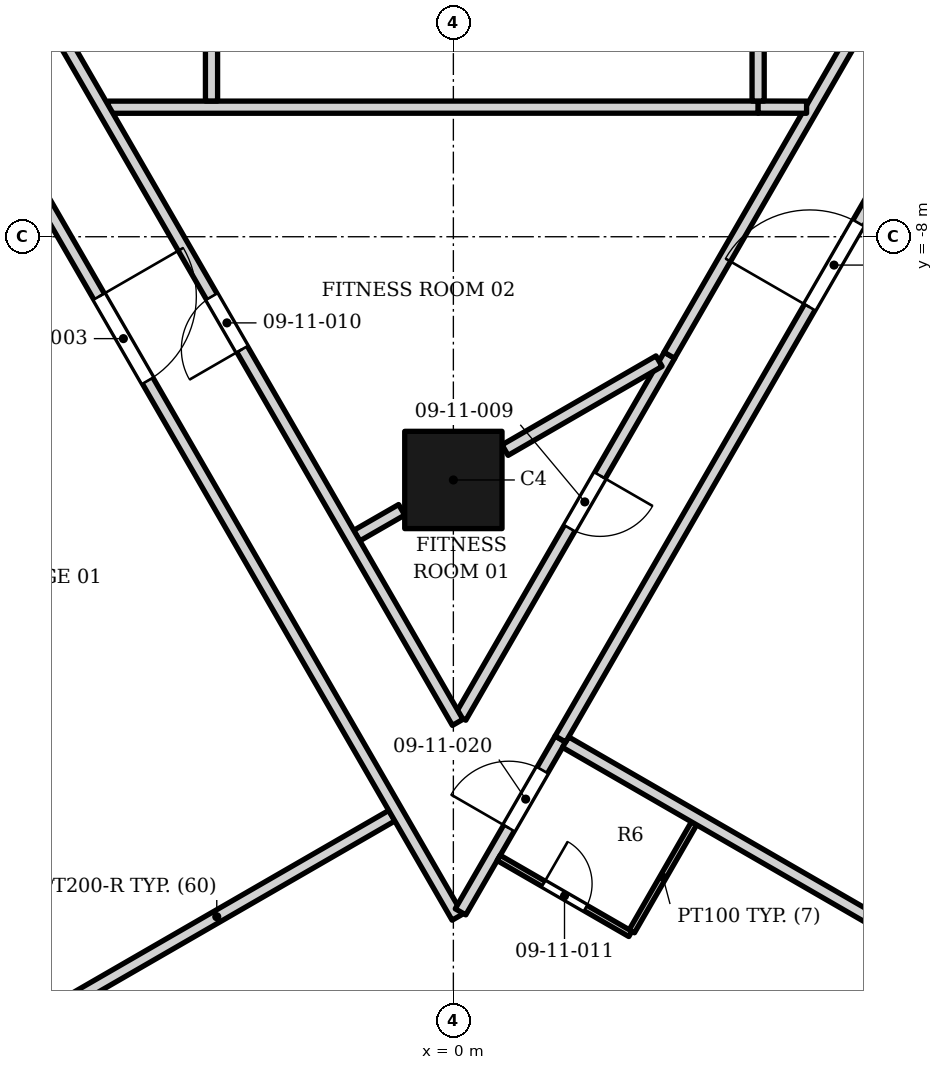
"""IFC4 building model, lengths in metres.
Left out: names, types, materials, properties, quantities, classifications, styles, units other than length and angle.
Written with IfcOpenShell. Run it as: python <this file> out.ifc"""

import sys

from ifc_helpers import new_model, si_unit, direction, frame, frame_2d, origin, origin_2d, place, context, subcontext, project, spatial, rectangle, extrude, element, fill, save


model = new_model("IFC4")
c1 = context("Model", 3, precision=1e-05, world=origin(), true_north=direction((0.0, 1.0)))
c2 = subcontext(c1, "Body", "Model", "MODEL_VIEW")
j1 = project(units=[si_unit("LENGTHUNIT", "METRE"), si_unit("PLANEANGLEUNIT", "RADIAN")], contexts=[c1])
p1 = place(None, origin())
s1 = spatial("IfcSite", under=j1, at=p1, CompositionType="ELEMENT")
p2 = place(p1, origin())
s2 = spatial("IfcBuilding", under=s1, at=p2, CompositionType="ELEMENT")
p3 = place(p2, frame((0.0, 0.0, 56.2)))
s3 = spatial("IfcBuildingStorey", under=s2, at=p3, CompositionType="ELEMENT", Elevation=56.2)
p4 = place(p3, frame((0.0, -12.0, 0.0), z_axis=(0.0, 0.0, 1.0), x_axis=(1.0, 0.0, 0.0)))
e1 = element("IfcColumn", 1, at=p4, inside=s3, PredefinedType="COLUMN", context=c2, shape_type="SweptSolid", body=[
    extrude(rectangle(XDim=1.6, YDim=1.6, at=origin_2d()), origin(), (0.0, 0.0, 1.0), 3.4),
])
p5 = place(p3, frame((6.165, -23.826, 0.0), z_axis=(0.0, 0.0, 1.0), x_axis=(0.500027713859, 0.866009402589, 0.0)))
e2 = element("IfcWall", 2, at=p5, inside=s3, PredefinedType="ELEMENTEDWALL", context=c2, shape_type="SweptSolid", body=[
    extrude(rectangle(XDim=4.2, YDim=0.2, at=frame_2d((2.1, 0.0))), origin(), (0.0, 0.0, 1.0), 2.65),
])
p6 = place(p5, frame((0.3, 0.0, 0.6)))
e3 = element("IfcOpeningElement", 3, at=p6, cuts=e2, PredefinedType="OPENING", context=c2, shape_type="SweptSolid", body=[
    extrude(rectangle(XDim=2.1, YDim=1.8, at=frame_2d((1.05, 0.9))), frame((0.0, 0.11, 0.0), z_axis=(0.0, -1.0, 0.0), x_axis=(1.0, 0.0, 0.0)), (0.0, 0.0, 1.0), 0.22),
])
p7 = place(p5, frame((2.7, 0.0, 0.0)))
e4 = element("IfcOpeningElement", 4, at=p7, cuts=e2, PredefinedType="OPENING", context=c2, shape_type="SweptSolid", body=[
    extrude(rectangle(XDim=1.2, YDim=2.4, at=frame_2d((0.6, 1.2))), frame((0.0, 0.11, 0.0), z_axis=(0.0, -1.0, 0.0), x_axis=(1.0, 0.0, 0.0)), (0.0, 0.0, 1.0), 0.22),
])
p8 = place(p3, frame((-6.771, -20.844, 0.0), z_axis=(0.0, 0.0, 1.0), x_axis=(0.866140962391, 0.499799793185, 0.0)))
e5 = element("IfcWall", 5, at=p8, inside=s3, PredefinedType="PARTITIONING", context=c2, shape_type="SweptSolid", body=[
    extrude(rectangle(XDim=6.65, YDim=0.2, at=frame_2d((3.325, 0.0))), origin(), (0.0, 0.0, 1.0), 2.552),
])
p9 = place(p3, frame((2.935, -19.422, 0.0), z_axis=(0.0, 0.0, 1.0), x_axis=(0.499354689006, 0.866397653833, 0.0)))
e6 = element("IfcWall", 6, at=p9, inside=s3, PredefinedType="PARTITIONING", context=c2, shape_type="SweptSolid", body=[
    extrude(rectangle(XDim=2.05, YDim=0.1, at=frame_2d((1.025, 0.0))), origin(), (0.0, 0.0, 1.0), 3.23),
])
p10 = place(p3, frame((-11.227, 0.37, 0.0), z_axis=(0.0, 0.0, 1.0), x_axis=(0.500006900114, -0.866021419965, 0.0)))
e7 = element("IfcWall", 7, at=p10, inside=s3, PredefinedType="PARTITIONING", context=c2, shape_type="SweptSolid", body=[
    extrude(rectangle(XDim=22.586, YDim=0.2, at=frame_2d((11.293, 0.0))), origin(), (0.0, 0.0, 1.0), 2.374),
])
p11 = place(p10, frame((10.8, 0.0, 0.0)))
e8 = element("IfcOpeningElement", 8, at=p11, cuts=e7, PredefinedType="OPENING", context=c2, shape_type="SweptSolid", body=[
    extrude(rectangle(XDim=1.6, YDim=2.1, at=frame_2d((0.8, 1.05))), frame((0.0, 0.11, 0.0), z_axis=(0.0, -1.0, 0.0), x_axis=(1.0, 0.0, 0.0)), (0.0, 0.0, 1.0), 0.22),
])
p12 = place(p3, frame((0.118, -19.102, 0.0), z_axis=(0.0, 0.0, 1.0), x_axis=(0.500402764758, 0.865792742533, 0.0)))
e9 = element("IfcWall", 9, at=p12, inside=s3, PredefinedType="PARTITIONING", context=c2, shape_type="SweptSolid", body=[
    extrude(rectangle(XDim=3.282, YDim=0.2, at=frame_2d((1.641, 0.0))), origin(), (0.0, 0.0, 1.0), 2.628),
])
p13 = place(p12, frame((1.591, 0.0, 0.0)))
e10 = element("IfcOpeningElement", 10, at=p13, cuts=e9, PredefinedType="OPENING", context=c2, shape_type="SweptSolid", body=[
    extrude(rectangle(XDim=1.1, YDim=2.1, at=frame_2d((0.55, 1.05))), frame((0.0, 0.11, 0.0), z_axis=(0.0, -1.0, 0.0), x_axis=(1.0, 0.0, 0.0)), (0.0, 0.0, 1.0), 0.22),
])
p14 = place(p3, frame((0.745, -18.215, 0.0), z_axis=(0.0, 0.0, 1.0), x_axis=(0.866022959057, -0.500004234368, 0.0)))
e11 = element("IfcWall", 11, at=p14, inside=s3, PredefinedType="PARTITIONING", context=c2, shape_type="SweptSolid", body=[
    extrude(rectangle(XDim=2.5, YDim=0.1, at=frame_2d((1.25, 0.0))), origin(), (0.0, 0.0, 1.0), 3.23),
])
p15 = place(p14, frame((0.85, 0.0, 0.0)))
e12 = element("IfcOpeningElement", 12, at=p15, cuts=e11, PredefinedType="OPENING", context=c2, shape_type="SweptSolid", body=[
    extrude(rectangle(XDim=0.8, YDim=2.1, at=frame_2d((0.4, 1.05))), frame((0.0, 0.06, 0.0), z_axis=(0.0, -1.0, 0.0), x_axis=(1.0, 0.0, 0.0)), (0.0, 0.0, 1.0), 0.12),
])
p16 = place(p3, frame((1.844, -16.311, 0.0), z_axis=(0.0, 0.0, 1.0), x_axis=(0.866037373075, -0.499979268008, 0.0)))
e13 = element("IfcWall", 13, at=p16, inside=s3, PredefinedType="PARTITIONING", context=c2, shape_type="SweptSolid", body=[
    extrude(rectangle(XDim=7.05, YDim=0.2, at=frame_2d((3.525, 0.0))), origin(), (0.0, 0.0, 1.0), 2.552),
])
p17 = place(p3, frame((0.117, -15.901, 0.0), z_axis=(0.0, 0.0, 1.0), x_axis=(0.49997760006, 0.866038336009, 0.0)))
e14 = element("IfcWall", 14, at=p17, inside=s3, PredefinedType="PARTITIONING", context=c2, shape_type="SweptSolid", body=[
    extrude(rectangle(XDim=6.875, YDim=0.2, at=frame_2d((3.438, 0.0))), origin(), (0.0, 0.0, 1.0), 2.302),
])
p18 = place(p17, frame((3.588, 0.0, 0.0)))
e15 = element("IfcOpeningElement", 15, at=p18, cuts=e14, PredefinedType="OPENING", context=c2, shape_type="SweptSolid", body=[
    extrude(rectangle(XDim=1.0, YDim=2.1, at=frame_2d((0.5, 1.05))), frame((0.0, 0.11, 0.0), z_axis=(0.0, -1.0, 0.0), x_axis=(1.0, 0.0, 0.0)), (0.0, 0.0, 1.0), 0.22),
])
p19 = place(p3, frame((-1.591, -12.916, 0.0), z_axis=(0.0, 0.0, 1.0), x_axis=(0.866903215232, 0.498476494351, 0.0)))
e16 = element("IfcWall", 16, at=p19, inside=s3, PredefinedType="PARTITIONING", context=c2, shape_type="SweptSolid", body=[
    extrude(rectangle(XDim=0.854, YDim=0.2, at=frame_2d((0.427, 0.0))), origin(), (0.0, 0.0, 1.0), 3.23),
])
p20 = place(p3, frame((0.85, -11.509, 0.0), z_axis=(0.0, 0.0, 1.0), x_axis=(0.865875518892, 0.500259518434, 0.0)))
e17 = element("IfcWall", 17, at=p20, inside=s3, PredefinedType="PARTITIONING", context=c2, shape_type="SweptSolid", body=[
    extrude(rectangle(XDim=2.925, YDim=0.2, at=frame_2d((1.462, 0.0))), origin(), (0.0, 0.0, 1.0), 3.23),
])
p21 = place(p3, frame((3.552, -9.949, 0.0), z_axis=(0.0, 0.0, 1.0), x_axis=(0.4999924075, 0.866029787272, 0.0)))
e18 = element("IfcWall", 18, at=p21, inside=s3, PredefinedType="PARTITIONING", context=c2, shape_type="SweptSolid", body=[
    extrude(rectangle(XDim=15.761, YDim=0.2, at=frame_2d((7.881, 0.0))), origin(), (0.0, 0.0, 1.0), 2.384),
])
p22 = place(p21, frame((7.304, 0.0, 0.0)))
e19 = element("IfcOpeningElement", 19, at=p22, cuts=e18, PredefinedType="OPENING", context=c2, shape_type="SweptSolid", body=[
    extrude(rectangle(XDim=1.0, YDim=2.1, at=frame_2d((0.5, 1.05))), frame((0.0, 0.11, 0.0), z_axis=(0.0, -1.0, 0.0), x_axis=(1.0, 0.0, 0.0)), (0.0, 0.0, 1.0), 0.22),
])
p23 = place(p21, frame((11.727, 0.0, 0.0)))
e20 = element("IfcOpeningElement", 20, at=p23, cuts=e18, PredefinedType="OPENING", context=c2, shape_type="SweptSolid", body=[
    extrude(rectangle(XDim=1.0, YDim=2.1, at=frame_2d((0.5, 1.05))), frame((0.0, 0.11, 0.0), z_axis=(0.0, -1.0, 0.0), x_axis=(1.0, 0.0, 0.0)), (0.0, 0.0, 1.0), 0.22),
])
p24 = place(p3, frame((-5.674, -5.87, 0.0), z_axis=(0.0, 0.0, 1.0), x_axis=(0.999999987222, 0.000159861147, 0.0)))
e21 = element("IfcWall", 21, at=p24, inside=s3, PredefinedType="PARTITIONING", context=c2, shape_type="SweptSolid", body=[
    extrude(rectangle(XDim=10.69, YDim=0.2, at=frame_2d((5.345, 0.0))), origin(), (0.0, 0.0, 1.0), 3.23),
])
p25 = place(p3, frame((5.012, -5.868, 0.0), z_axis=(0.0, 0.0, 1.0), x_axis=(0.99999831045, -0.001838232188, 0.0)))
e22 = element("IfcWall", 22, at=p25, inside=s3, PredefinedType="PARTITIONING", context=c2, shape_type="SweptSolid", body=[
    extrude(rectangle(XDim=0.797, YDim=0.2, at=frame_2d((0.398, 0.0))), origin(), (0.0, 0.0, 1.0), 3.23),
])
p26 = place(p3, frame((5.012, -5.768, 0.0), z_axis=(0.0, 0.0, 1.0), x_axis=(0.0, 1.0, 0.0)))
e23 = element("IfcWall", 23, at=p26, inside=s3, PredefinedType="PARTITIONING", context=c2, shape_type="SweptSolid", body=[
    extrude(rectangle(XDim=9.797, YDim=0.2, at=frame_2d((4.898, 0.0))), origin(), (0.0, 0.0, 1.0), 3.23),
])
p27 = place(p3, frame((1.76, -16.26, 0.0), z_axis=(0.0, 0.0, 1.0), x_axis=(0.5000018851, 0.866024315419, 0.0)))
e24 = element("IfcWall", 24, at=p27, inside=s3, PredefinedType="PARTITIONING", context=c2, shape_type="SweptSolid", body=[
    extrude(rectangle(XDim=18.0, YDim=0.2, at=frame_2d((9.0, 0.0))), origin(), (0.0, 0.0, 1.0), 2.302),
])
p28 = place(p27, frame((8.2, 0.0, 0.0)))
e25 = element("IfcOpeningElement", 25, at=p28, cuts=e24, PredefinedType="OPENING", context=c2, shape_type="SweptSolid", body=[
    extrude(rectangle(XDim=1.6, YDim=2.1, at=frame_2d((0.8, 1.05))), frame((0.0, 0.11, 0.0), z_axis=(0.0, -1.0, 0.0), x_axis=(1.0, 0.0, 0.0)), (0.0, 0.0, 1.0), 0.22),
])
p29 = place(p3, frame((-3.979, 2.252, 0.0), z_axis=(0.0, 0.0, 1.0), x_axis=(0.000213083311, -0.999999977298, 0.0)))
e26 = element("IfcWall", 26, at=p29, inside=s3, PredefinedType="PARTITIONING", context=c2, shape_type="SweptSolid", body=[
    extrude(rectangle(XDim=8.02, YDim=0.2, at=frame_2d((4.01, 0.0))), origin(), (0.0, 0.0, 1.0), 3.23),
])
p30 = place(p3, frame((-11.299, 3.7, 0.0), z_axis=(0.0, 0.0, 1.0), x_axis=(0.500141073811, -0.86594393946, 0.0)))
e27 = element("IfcWall", 27, at=p30, inside=s3, PredefinedType="PARTITIONING", context=c2, shape_type="SweptSolid", body=[
    extrude(rectangle(XDim=22.733, YDim=0.2, at=frame_2d((11.367, 0.0))), origin(), (0.0, 0.0, 1.0), 2.374),
])
p31 = place(p30, frame((5.025, 0.0, 0.0)))
e28 = element("IfcOpeningElement", 28, at=p31, cuts=e27, PredefinedType="OPENING", context=c2, shape_type="SweptSolid", body=[
    extrude(rectangle(XDim=1.0, YDim=2.1, at=frame_2d((0.5, 1.05))), frame((0.0, 0.11, 0.0), z_axis=(0.0, -1.0, 0.0), x_axis=(1.0, 0.0, 0.0)), (0.0, 0.0, 1.0), 0.22),
])
p32 = place(p30, frame((14.647, 0.0, 0.0)))
e29 = element("IfcOpeningElement", 29, at=p32, cuts=e27, PredefinedType="OPENING", context=c2, shape_type="SweptSolid", body=[
    extrude(rectangle(XDim=1.0, YDim=2.1, at=frame_2d((0.5, 1.05))), frame((0.0, 0.11, 0.0), z_axis=(0.0, -1.0, 0.0), x_axis=(1.0, 0.0, 0.0)), (0.0, 0.0, 1.0), 0.22),
])
p33 = place(p11, origin())
e30 = element("IfcDoor", 30, at=p33, inside=s3, OperationType="DOUBLE_DOOR_SINGLE_SWING", PredefinedType="DOOR", context=c2, shape_type="SweptSolid", body=[
    extrude(rectangle(XDim=1.6, YDim=2.1, at=frame_2d((0.8, 1.05))), frame((0.0, 0.025, 0.0), z_axis=(0.0, -1.0, 0.0), x_axis=(1.0, 0.0, 0.0)), (0.0, 0.0, 1.0), 0.05),
])
fill(e8, e30)
p34 = place(p28, origin())
e31 = element("IfcDoor", 31, at=p34, inside=s3, OperationType="DOUBLE_DOOR_SINGLE_SWING", PredefinedType="DOOR", context=c2, shape_type="SweptSolid", body=[
    extrude(rectangle(XDim=1.6, YDim=2.1, at=frame_2d((0.8, 1.05))), frame((0.0, 0.025, 0.0), z_axis=(0.0, -1.0, 0.0), x_axis=(1.0, 0.0, 0.0)), (0.0, 0.0, 1.0), 0.05),
])
fill(e25, e31)
p35 = place(p18, origin())
e32 = element("IfcDoor", 32, at=p35, inside=s3, OperationType="SINGLE_SWING_RIGHT", PredefinedType="DOOR", context=c2, shape_type="SweptSolid", body=[
    extrude(rectangle(XDim=1.0, YDim=2.1, at=frame_2d((0.5, 1.05))), frame((0.0, 0.025, 0.0), z_axis=(0.0, -1.0, 0.0), x_axis=(1.0, 0.0, 0.0)), (0.0, 0.0, 1.0), 0.05),
])
fill(e15, e32)
p36 = place(p32, origin())
e33 = element("IfcDoor", 33, at=p36, inside=s3, OperationType="SINGLE_SWING_RIGHT", PredefinedType="DOOR", context=c2, shape_type="SweptSolid", body=[
    extrude(rectangle(XDim=1.0, YDim=2.1, at=frame_2d((0.5, 1.05))), frame((0.0, 0.025, 0.0), z_axis=(0.0, -1.0, 0.0), x_axis=(1.0, 0.0, 0.0)), (0.0, 0.0, 1.0), 0.05),
])
fill(e29, e33)
p37 = place(p15, origin())
e34 = element("IfcDoor", 34, at=p37, inside=s3, OperationType="SINGLE_SWING_LEFT", PredefinedType="DOOR", context=c2, shape_type="SweptSolid", body=[
    extrude(rectangle(XDim=0.8, YDim=2.1, at=frame_2d((0.4, 1.05))), frame((0.0, 0.025, 0.0), z_axis=(0.0, -1.0, 0.0), x_axis=(1.0, 0.0, 0.0)), (0.0, 0.0, 1.0), 0.05),
])
fill(e12, e34)
p38 = place(p13, origin())
e35 = element("IfcDoor", 35, at=p38, inside=s3, OperationType="SINGLE_SWING_LEFT", PredefinedType="DOOR", context=c2, shape_type="SweptSolid", body=[
    extrude(rectangle(XDim=1.1, YDim=2.1, at=frame_2d((0.55, 1.05))), frame((0.0, 0.025, 0.0), z_axis=(0.0, -1.0, 0.0), x_axis=(1.0, 0.0, 0.0)), (0.0, 0.0, 1.0), 0.05),
])
fill(e10, e35)
save(model, sys.argv[1])
